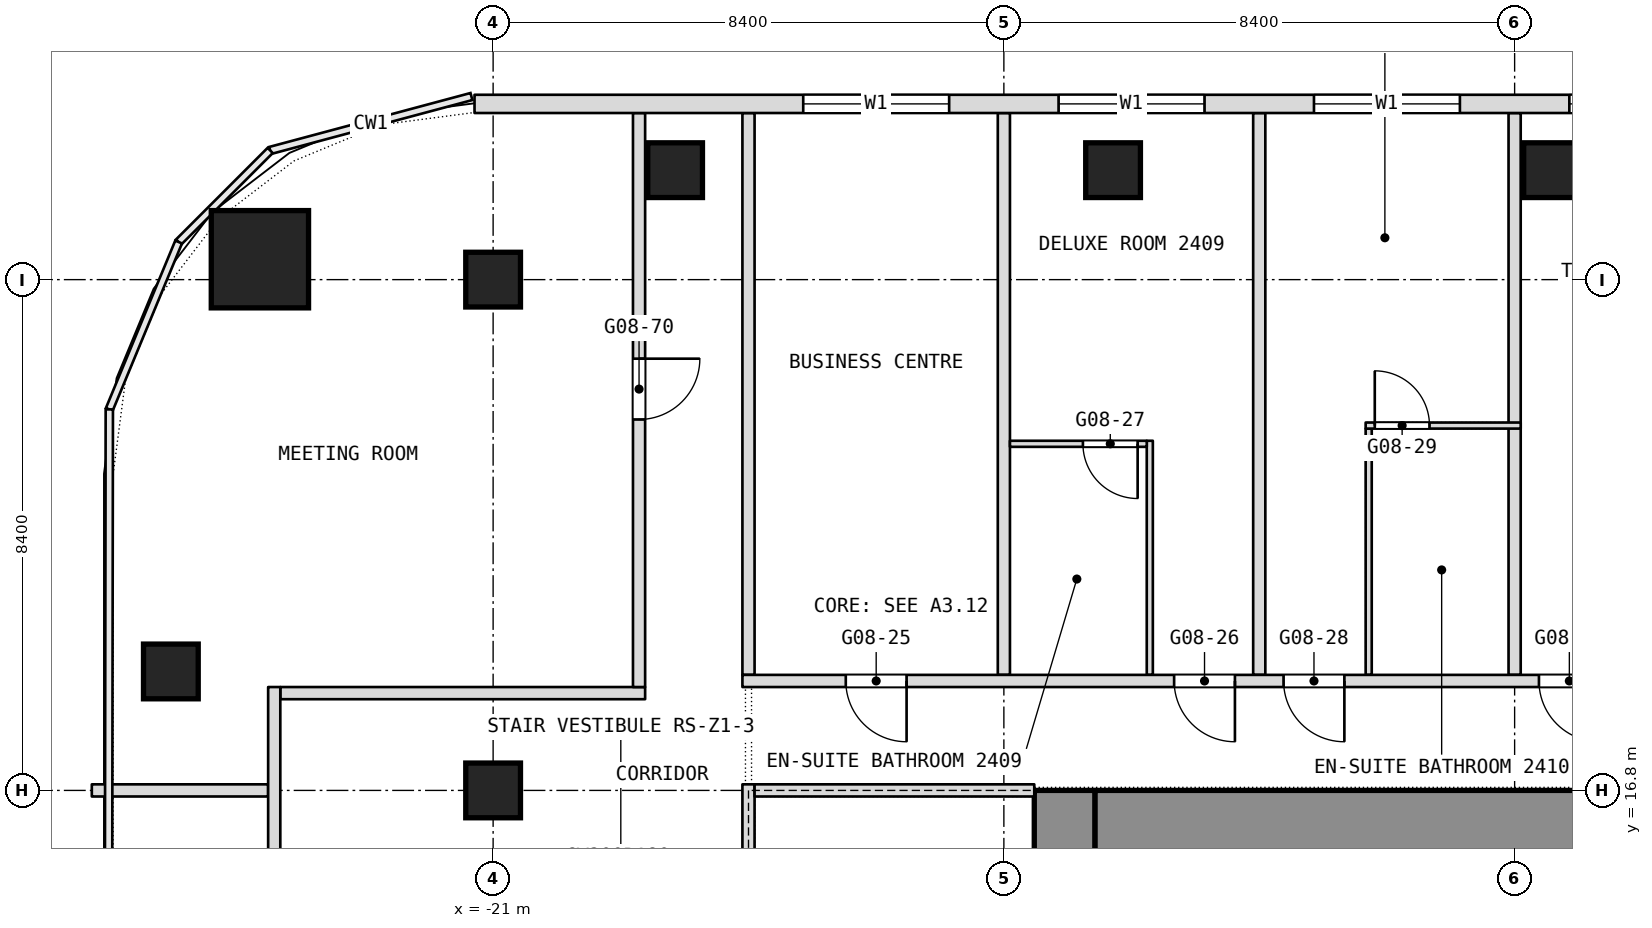
"""IFC4 building model, lengths in metres.
Left out: names, types, materials, properties, quantities, classifications, styles, units other than length and angle.
Written with IfcOpenShell. Run it as: python <this file> out.ifc"""

import sys

from ifc_helpers import new_model, si_unit, direction, frame, frame_2d, origin, origin_2d, place, context, subcontext, project, spatial, rectangle, extrude, element, fill, save


model = new_model("IFC4")
c1 = context("Model", 3, precision=1e-05, world=origin(), true_north=direction((0.0, 1.0)))
c2 = subcontext(c1, "Body", "Model", "MODEL_VIEW")
j1 = project(units=[si_unit("LENGTHUNIT", "METRE"), si_unit("PLANEANGLEUNIT", "RADIAN")], contexts=[c1])
p1 = place(None, origin())
s1 = spatial("IfcSite", under=j1, at=p1, CompositionType="ELEMENT")
p2 = place(p1, origin())
s2 = spatial("IfcBuilding", under=s1, at=p2, CompositionType="ELEMENT")
p3 = place(p2, frame((0.0, 0.0, 112.1)))
s3 = spatial("IfcBuildingStorey", under=s2, at=p3, CompositionType="ELEMENT", Elevation=112.1)
p4 = place(p3, frame((-11.6, 0.0, 0.0), z_axis=(0.0, 0.0, 1.0), x_axis=(0.0, 1.0, 0.0)))
e1 = element("IfcWall", 1, at=p4, inside=s3, PredefinedType="SHEAR", context=c2, shape_type="SweptSolid", body=[
    extrude(rectangle(XDim=16.8, YDim=1.0, at=frame_2d((8.4, 0.0))), origin(), (0.0, 0.0, 1.0), 3.6),
])
p5 = place(p4, frame((1.762, 0.0, 0.0)))
e2 = element("IfcOpeningElement", 2, at=p5, cuts=e1, PredefinedType="OPENING", context=c2, shape_type="SweptSolid", body=[
    extrude(rectangle(XDim=0.9, YDim=2.1, at=frame_2d((0.45, 1.05))), frame((0.0, 0.5, 0.0), z_axis=(0.0, -1.0, 0.0), x_axis=(1.0, 0.0, 0.0)), (0.0, 0.0, 1.0), 1.0),
])
p6 = place(p4, frame((4.387, 0.0, 0.0)))
e3 = element("IfcOpeningElement", 3, at=p6, cuts=e1, PredefinedType="OPENING", context=c2, shape_type="SweptSolid", body=[
    extrude(rectangle(XDim=0.9, YDim=2.1, at=frame_2d((0.45, 1.05))), frame((0.0, 0.5, 0.0), z_axis=(0.0, -1.0, 0.0), x_axis=(1.0, 0.0, 0.0)), (0.0, 0.0, 1.0), 1.0),
])
p7 = place(p4, frame((6.825, 0.0, 0.0)))
e4 = element("IfcOpeningElement", 4, at=p7, cuts=e1, PredefinedType="OPENING", context=c2, shape_type="SweptSolid", body=[
    extrude(rectangle(XDim=1.2, YDim=2.1, at=frame_2d((0.6, 1.05))), frame((0.0, 0.5, 0.0), z_axis=(0.0, -1.0, 0.0), x_axis=(1.0, 0.0, 0.0)), (0.0, 0.0, 1.0), 1.0),
])
p8 = place(p4, frame((12.3, 0.0, 0.0)))
e5 = element("IfcOpeningElement", 5, at=p8, cuts=e1, PredefinedType="OPENING", context=c2, shape_type="SweptSolid", body=[
    extrude(rectangle(XDim=0.9, YDim=2.1, at=frame_2d((0.45, 1.05))), frame((0.0, 0.5, 0.0), z_axis=(0.0, -1.0, 0.0), x_axis=(1.0, 0.0, 0.0)), (0.0, 0.0, 1.0), 1.0),
])
p9 = place(p4, frame((8.775, 0.0, 0.0)))
e6 = element("IfcOpeningElement", 6, at=p9, cuts=e1, PredefinedType="OPENING", context=c2, shape_type="SweptSolid", body=[
    extrude(rectangle(XDim=1.2, YDim=2.1, at=frame_2d((0.6, 1.05))), frame((0.0, 0.5, 0.0), z_axis=(0.0, -1.0, 0.0), x_axis=(1.0, 0.0, 0.0)), (0.0, 0.0, 1.0), 1.0),
])
p10 = place(p3, frame((-11.1, 16.3, 0.0), z_axis=(0.0, 0.0, 1.0), x_axis=(1.0, 0.0, 0.0)))
e7 = element("IfcWall", 7, at=p10, inside=s3, PredefinedType="SHEAR", context=c2, shape_type="SweptSolid", body=[
    extrude(rectangle(XDim=22.2, YDim=1.0, at=frame_2d((11.1, 0.0))), origin(), (0.0, 0.0, 1.0), 3.6),
])
p11 = place(p3, frame((-24.835, 25.535, 0.0), z_axis=(0.0, 0.0, 1.0), x_axis=(1.0, 0.0, 0.0)))
e8 = element("IfcColumn", 8, at=p11, inside=s3, PredefinedType="COLUMN", context=c2, shape_type="SweptSolid", body=[
    extrude(rectangle(XDim=1.6, YDim=1.6, at=origin_2d()), origin(), (0.0, 0.0, 1.0), 3.6),
])
for number, where, z_axis, x_axis in (
    (9, (-21.0, 16.8, 0.0), (0.0, 0.0, 1.0), (1.0, 0.0, 0.0)),
    (10, (-21.0, 25.2, 0.0), (0.0, 0.0, 1.0), (1.0, 0.0, 0.0)),
    (11, (-26.3, 18.756, 0.0), (0.0, 0.0, 1.0), (1.0, 0.0, 0.0)),
    (12, (-18.007, 27.0, 0.0), (0.0, 0.0, 1.0), (1.0, 0.0, 0.0)),
    (13, (-10.804, 27.0, 0.0), (0.0, 0.0, 1.0), (1.0, 0.0, 0.0)),
    (14, (-3.601, 27.0, 0.0), (0.0, 0.0, 1.0), (1.0, 0.0, 0.0)),
):
    element("IfcColumn", number, at=place(p3, frame(where, z_axis=z_axis, x_axis=x_axis)), inside=s3, PredefinedType="COLUMN", context=c2, shape_type="SweptSolid", body=[
        extrude(rectangle(XDim=0.9, YDim=0.9, at=origin_2d()), origin(), (0.0, 0.0, 1.0), 3.6),
    ])
p12 = place(p3, frame((-4.2, 18.7, 0.0), z_axis=(0.0, 0.0, 1.0), x_axis=(0.0, 1.0, 0.0)))
e15 = element("IfcWall", 15, at=p12, inside=s3, PredefinedType="PARTITIONING", context=c2, shape_type="SweptSolid", body=[
    extrude(rectangle(XDim=9.24, YDim=0.2, at=frame_2d((4.62, 0.0))), origin(), (0.0, 0.0, 1.0), 3.34),
])
p13 = place(p3, frame((-6.6, 18.7, 0.0), z_axis=(0.0, 0.0, 1.0), x_axis=(0.0, 1.0, 0.0)))
e16 = element("IfcWall", 16, at=p13, inside=s3, PredefinedType="PARTITIONING", context=c2, shape_type="SweptSolid", body=[
    extrude(rectangle(XDim=4.05, YDim=0.1, at=frame_2d((2.025, 0.0))), origin(), (0.0, 0.0, 1.0), 3.34),
])
p14 = place(p3, frame((-8.4, 18.7, 0.0), z_axis=(0.0, 0.0, 1.0), x_axis=(0.0, 1.0, 0.0)))
e17 = element("IfcWall", 17, at=p14, inside=s3, PredefinedType="PARTITIONING", context=c2, shape_type="SweptSolid", body=[
    extrude(rectangle(XDim=9.24, YDim=0.2, at=frame_2d((4.62, 0.0))), origin(), (0.0, 0.0, 1.0), 3.34),
])
p15 = place(p3, frame((-10.2, 18.7, 0.0), z_axis=(0.0, 0.0, 1.0), x_axis=(0.0, 1.0, 0.0)))
e18 = element("IfcWall", 18, at=p15, inside=s3, PredefinedType="PARTITIONING", context=c2, shape_type="SweptSolid", body=[
    extrude(rectangle(XDim=3.85, YDim=0.1, at=frame_2d((1.925, 0.0))), origin(), (0.0, 0.0, 1.0), 3.34),
])
for number, where, z_axis, x_axis in (
    (19, (-12.6, 18.7, 0.0), (0.0, 0.0, 1.0), (0.0, 1.0, 0.0)),
    (20, (-16.8, 18.7, 0.0), (0.0, 0.0, 1.0), (0.0, 1.0, 0.0)),
):
    element("IfcWall", number, at=place(p3, frame(where, z_axis=z_axis, x_axis=x_axis)), inside=s3, PredefinedType="PARTITIONING", context=c2, shape_type="SweptSolid", body=[
        extrude(rectangle(XDim=9.24, YDim=0.2, at=frame_2d((4.62, 0.0))), origin(), (0.0, 0.0, 1.0), 3.34),
    ])
p16 = place(p3, frame((-27.6, 16.8, 0.0), z_axis=(0.0, 0.0, 1.0), x_axis=(1.0, 0.0, 0.0)))
e21 = element("IfcWall", 21, at=p16, inside=s3, PredefinedType="PARTITIONING", context=c2, shape_type="SweptSolid", body=[
    extrude(rectangle(XDim=2.9, YDim=0.2, at=frame_2d((1.45, 0.0))), origin(), (0.0, 0.0, 1.0), 2.89),
])
p17 = place(p3, frame((-24.5, 18.4, 0.0), z_axis=(0.0, 0.0, 1.0), x_axis=(1.0, 0.0, 0.0)))
e22 = element("IfcWall", 22, at=p17, inside=s3, PredefinedType="PARTITIONING", context=c2, shape_type="SweptSolid", body=[
    extrude(rectangle(XDim=6.0, YDim=0.2, at=frame_2d((3.0, 0.0))), origin(), (0.0, 0.0, 1.0), 3.34),
])
p18 = place(p3, frame((-18.6, 18.5, 0.0), z_axis=(0.0, 0.0, 1.0), x_axis=(0.0, 1.0, 0.0)))
e23 = element("IfcWall", 23, at=p18, inside=s3, PredefinedType="PARTITIONING", context=c2, shape_type="SweptSolid", body=[
    extrude(rectangle(XDim=9.44, YDim=0.2, at=frame_2d((4.72, 0.0))), origin(), (0.0, 0.0, 1.0), 3.34),
])
p19 = place(p18, frame((4.4, 0.0, 0.0)))
e24 = element("IfcOpeningElement", 24, at=p19, cuts=e23, PredefinedType="OPENING", context=c2, shape_type="SweptSolid", body=[
    extrude(rectangle(XDim=1.0, YDim=2.1, at=frame_2d((0.5, 1.05))), frame((0.0, 0.1, 0.0), z_axis=(0.0, -1.0, 0.0), x_axis=(1.0, 0.0, 0.0)), (0.0, 0.0, 1.0), 0.2),
])
p20 = place(p3, frame((-16.9, 18.6, 0.0), z_axis=(0.0, 0.0, 1.0), x_axis=(1.0, 0.0, 0.0)))
e25 = element("IfcWall", 25, at=p20, inside=s3, PredefinedType="PARTITIONING", context=c2, shape_type="SweptSolid", body=[
    extrude(rectangle(XDim=18.4, YDim=0.2, at=frame_2d((9.2, 0.0))), origin(), (0.0, 0.0, 1.0), 3.34),
])
p21 = place(p20, frame((1.7, 0.0, 0.0)))
e26 = element("IfcOpeningElement", 26, at=p21, cuts=e25, PredefinedType="OPENING", context=c2, shape_type="SweptSolid", body=[
    extrude(rectangle(XDim=1.0, YDim=2.1, at=frame_2d((0.5, 1.05))), frame((0.0, 0.1, 0.0), z_axis=(0.0, -1.0, 0.0), x_axis=(1.0, 0.0, 0.0)), (0.0, 0.0, 1.0), 0.2),
])
p22 = place(p20, frame((7.1, 0.0, 0.0)))
e27 = element("IfcOpeningElement", 27, at=p22, cuts=e25, PredefinedType="OPENING", context=c2, shape_type="SweptSolid", body=[
    extrude(rectangle(XDim=1.0, YDim=2.1, at=frame_2d((0.5, 1.05))), frame((0.0, 0.1, 0.0), z_axis=(0.0, -1.0, 0.0), x_axis=(1.0, 0.0, 0.0)), (0.0, 0.0, 1.0), 0.2),
])
p23 = place(p20, frame((8.9, 0.0, 0.0)))
e28 = element("IfcOpeningElement", 28, at=p23, cuts=e25, PredefinedType="OPENING", context=c2, shape_type="SweptSolid", body=[
    extrude(rectangle(XDim=1.0, YDim=2.1, at=frame_2d((0.5, 1.05))), frame((0.0, 0.1, 0.0), z_axis=(0.0, -1.0, 0.0), x_axis=(1.0, 0.0, 0.0)), (0.0, 0.0, 1.0), 0.2),
])
p24 = place(p20, frame((13.1, 0.0, 0.0)))
e29 = element("IfcOpeningElement", 29, at=p24, cuts=e25, PredefinedType="OPENING", context=c2, shape_type="SweptSolid", body=[
    extrude(rectangle(XDim=1.0, YDim=2.1, at=frame_2d((0.5, 1.05))), frame((0.0, 0.1, 0.0), z_axis=(0.0, -1.0, 0.0), x_axis=(1.0, 0.0, 0.0)), (0.0, 0.0, 1.0), 0.2),
])
p25 = place(p3, frame((-12.5, 22.5, 0.0), z_axis=(0.0, 0.0, 1.0), x_axis=(1.0, 0.0, 0.0)))
e30 = element("IfcWall", 30, at=p25, inside=s3, PredefinedType="PARTITIONING", context=c2, shape_type="SweptSolid", body=[
    extrude(rectangle(XDim=2.25, YDim=0.1, at=frame_2d((1.125, 0.0))), origin(), (0.0, 0.0, 1.0), 3.34),
])
p26 = place(p25, frame((1.2, 0.0, 0.0)))
e31 = element("IfcOpeningElement", 31, at=p26, cuts=e30, PredefinedType="OPENING", context=c2, shape_type="SweptSolid", body=[
    extrude(rectangle(XDim=0.9, YDim=2.1, at=frame_2d((0.45, 1.05))), frame((0.0, 0.05, 0.0), z_axis=(0.0, -1.0, 0.0), x_axis=(1.0, 0.0, 0.0)), (0.0, 0.0, 1.0), 0.1),
])
p27 = place(p3, frame((-6.65, 22.8, 0.0), z_axis=(0.0, 0.0, 1.0), x_axis=(1.0, 0.0, 0.0)))
e32 = element("IfcWall", 32, at=p27, inside=s3, PredefinedType="PARTITIONING", context=c2, shape_type="SweptSolid", body=[
    extrude(rectangle(XDim=2.55, YDim=0.1, at=frame_2d((1.275, 0.0))), origin(), (0.0, 0.0, 1.0), 3.34),
])
p28 = place(p27, frame((0.15, 0.0, 0.0)))
e33 = element("IfcOpeningElement", 33, at=p28, cuts=e32, PredefinedType="OPENING", context=c2, shape_type="SweptSolid", body=[
    extrude(rectangle(XDim=0.9, YDim=2.1, at=frame_2d((0.45, 1.05))), frame((0.0, 0.05, 0.0), z_axis=(0.0, -1.0, 0.0), x_axis=(1.0, 0.0, 0.0)), (0.0, 0.0, 1.0), 0.1),
])
p29 = place(p3, frame((-24.6, 6.9, 0.0), z_axis=(0.0, 0.0, 1.0), x_axis=(0.0, 1.0, 0.0)))
e34 = element("IfcWall", 34, at=p29, inside=s3, PredefinedType="PARTITIONING", context=c2, shape_type="SweptSolid", body=[
    extrude(rectangle(XDim=11.6, YDim=0.2, at=frame_2d((5.8, 0.0))), origin(), (0.0, 0.0, 1.0), 3.34),
])
p30 = place(p29, frame((5.45, 0.0, 0.0)))
e35 = element("IfcOpeningElement", 35, at=p30, cuts=e34, PredefinedType="OPENING", context=c2, shape_type="SweptSolid", body=[
    extrude(rectangle(XDim=1.8, YDim=2.1, at=frame_2d((0.9, 1.05))), frame((0.0, 0.1, 0.0), z_axis=(0.0, -1.0, 0.0), x_axis=(1.0, 0.0, 0.0)), (0.0, 0.0, 1.0), 0.2),
])
p31 = place(p29, frame((0.3, 0.0, 0.0)))
e36 = element("IfcOpeningElement", 36, at=p31, cuts=e34, PredefinedType="OPENING", context=c2, shape_type="SweptSolid", body=[
    extrude(rectangle(XDim=1.0, YDim=2.1, at=frame_2d((0.5, 1.05))), frame((0.0, 0.1, 0.0), z_axis=(0.0, -1.0, 0.0), x_axis=(1.0, 0.0, 0.0)), (0.0, 0.0, 1.0), 0.2),
])
p32 = place(p3, frame((21.306, 28.09, 0.0), z_axis=(0.0, 0.0, 1.0), x_axis=(-1.0, 0.0, 0.0)))
e37 = element("IfcWall", 37, at=p32, inside=s3, PredefinedType="NOTDEFINED", context=c2, shape_type="SweptSolid", body=[
    extrude(rectangle(XDim=42.612, YDim=0.3, at=frame_2d((21.306, 0.0))), origin(), (0.0, 0.0, 1.0), 3.6),
])
p33 = place(p32, frame((5.406, 0.0, 0.9)))
e38 = element("IfcOpeningElement", 38, at=p33, cuts=e37, PredefinedType="OPENING", context=c2, shape_type="SweptSolid", body=[
    extrude(rectangle(XDim=2.4, YDim=2.1, at=frame_2d((1.2, 1.05))), frame((0.0, 0.15, 0.0), z_axis=(0.0, -1.0, 0.0), x_axis=(1.0, 0.0, 0.0)), (0.0, 0.0, 1.0), 0.3),
])
p34 = place(p32, frame((9.606, 0.0, 0.9)))
e39 = element("IfcOpeningElement", 39, at=p34, cuts=e37, PredefinedType="OPENING", context=c2, shape_type="SweptSolid", body=[
    extrude(rectangle(XDim=2.4, YDim=2.1, at=frame_2d((1.2, 1.05))), frame((0.0, 0.15, 0.0), z_axis=(0.0, -1.0, 0.0), x_axis=(1.0, 0.0, 0.0)), (0.0, 0.0, 1.0), 0.3),
])
p35 = place(p32, frame((13.806, 0.0, 0.9)))
e40 = element("IfcOpeningElement", 40, at=p35, cuts=e37, PredefinedType="OPENING", context=c2, shape_type="SweptSolid", body=[
    extrude(rectangle(XDim=2.4, YDim=2.1, at=frame_2d((1.2, 1.05))), frame((0.0, 0.15, 0.0), z_axis=(0.0, -1.0, 0.0), x_axis=(1.0, 0.0, 0.0)), (0.0, 0.0, 1.0), 0.3),
])
p36 = place(p32, frame((18.006, 0.0, 0.9)))
e41 = element("IfcOpeningElement", 41, at=p36, cuts=e37, PredefinedType="OPENING", context=c2, shape_type="SweptSolid", body=[
    extrude(rectangle(XDim=2.4, YDim=2.1, at=frame_2d((1.2, 1.05))), frame((0.0, 0.15, 0.0), z_axis=(0.0, -1.0, 0.0), x_axis=(1.0, 0.0, 0.0)), (0.0, 0.0, 1.0), 0.3),
])
p37 = place(p32, frame((22.206, 0.0, 0.9)))
e42 = element("IfcOpeningElement", 42, at=p37, cuts=e37, PredefinedType="OPENING", context=c2, shape_type="SweptSolid", body=[
    extrude(rectangle(XDim=2.4, YDim=2.1, at=frame_2d((1.2, 1.05))), frame((0.0, 0.15, 0.0), z_axis=(0.0, -1.0, 0.0), x_axis=(1.0, 0.0, 0.0)), (0.0, 0.0, 1.0), 0.3),
])
p38 = place(p32, frame((26.406, 0.0, 0.9)))
e43 = element("IfcOpeningElement", 43, at=p38, cuts=e37, PredefinedType="OPENING", context=c2, shape_type="SweptSolid", body=[
    extrude(rectangle(XDim=2.4, YDim=2.1, at=frame_2d((1.2, 1.05))), frame((0.0, 0.15, 0.0), z_axis=(0.0, -1.0, 0.0), x_axis=(1.0, 0.0, 0.0)), (0.0, 0.0, 1.0), 0.3),
])
p39 = place(p32, frame((30.606, 0.0, 0.9)))
e44 = element("IfcOpeningElement", 44, at=p39, cuts=e37, PredefinedType="OPENING", context=c2, shape_type="SweptSolid", body=[
    extrude(rectangle(XDim=2.4, YDim=2.1, at=frame_2d((1.2, 1.05))), frame((0.0, 0.15, 0.0), z_axis=(0.0, -1.0, 0.0), x_axis=(1.0, 0.0, 0.0)), (0.0, 0.0, 1.0), 0.3),
])
p40 = place(p32, frame((34.806, 0.0, 0.9)))
e45 = element("IfcOpeningElement", 45, at=p40, cuts=e37, PredefinedType="OPENING", context=c2, shape_type="SweptSolid", body=[
    extrude(rectangle(XDim=2.4, YDim=2.1, at=frame_2d((1.2, 1.05))), frame((0.0, 0.15, 0.0), z_axis=(0.0, -1.0, 0.0), x_axis=(1.0, 0.0, 0.0)), (0.0, 0.0, 1.0), 0.3),
])
p41 = place(p3, frame((-16.8, -0.1, 0.0), z_axis=(0.0, 0.0, 1.0), x_axis=(0.0, 1.0, 0.0)))
e46 = element("IfcWall", 46, at=p41, inside=s3, PredefinedType="PARTITIONING", context=c2, shape_type="SweptSolid", body=[
    extrude(rectangle(XDim=17.0, YDim=0.2, at=frame_2d((8.5, 0.0))), origin(), (0.0, 0.0, 1.0), 3.34),
])
p42 = place(p41, frame((2.2, 0.0, 0.0)))
e47 = element("IfcOpeningElement", 47, at=p42, cuts=e46, PredefinedType="OPENING", context=c2, shape_type="SweptSolid", body=[
    extrude(rectangle(XDim=1.8, YDim=2.1, at=frame_2d((0.9, 1.05))), frame((0.0, 0.1, 0.0), z_axis=(0.0, -1.0, 0.0), x_axis=(1.0, 0.0, 0.0)), (0.0, 0.0, 1.0), 0.2),
])
p43 = place(p41, frame((7.2, 0.0, 0.0)))
e48 = element("IfcOpeningElement", 48, at=p43, cuts=e46, PredefinedType="OPENING", context=c2, shape_type="SweptSolid", body=[
    extrude(rectangle(XDim=1.8, YDim=2.1, at=frame_2d((0.9, 1.05))), frame((0.0, 0.1, 0.0), z_axis=(0.0, -1.0, 0.0), x_axis=(1.0, 0.0, 0.0)), (0.0, 0.0, 1.0), 0.2),
])
p44 = place(p3, frame((-16.7, 16.8, 0.0), z_axis=(0.0, 0.0, 1.0), x_axis=(1.0, 0.0, 0.0)))
e49 = element("IfcWall", 49, at=p44, inside=s3, PredefinedType="PARTITIONING", context=c2, shape_type="SweptSolid", body=[
    extrude(rectangle(XDim=4.6, YDim=0.2, at=frame_2d((2.3, 0.0))), origin(), (0.0, 0.0, 1.0), 2.89),
])
p45 = place(p19, origin())
e50 = element("IfcDoor", 50, at=p45, inside=s3, OperationType="SINGLE_SWING_RIGHT", PredefinedType="DOOR", context=c2, shape_type="SweptSolid", body=[
    extrude(rectangle(XDim=1.0, YDim=2.1, at=frame_2d((0.5, 1.05))), frame((0.0, 0.025, 0.0), z_axis=(0.0, -1.0, 0.0), x_axis=(1.0, 0.0, 0.0)), (0.0, 0.0, 1.0), 0.05),
])
fill(e24, e50)
p46 = place(p21, origin())
e51 = element("IfcDoor", 51, at=p46, inside=s3, OperationType="SINGLE_SWING_RIGHT", PredefinedType="DOOR", context=c2, shape_type="SweptSolid", body=[
    extrude(rectangle(XDim=1.0, YDim=2.1, at=frame_2d((0.5, 1.05))), frame((0.0, 0.025, 0.0), z_axis=(0.0, -1.0, 0.0), x_axis=(1.0, 0.0, 0.0)), (0.0, 0.0, 1.0), 0.05),
])
fill(e26, e51)
p47 = place(p22, origin())
e52 = element("IfcDoor", 52, at=p47, inside=s3, OperationType="SINGLE_SWING_LEFT", PredefinedType="DOOR", context=c2, shape_type="SweptSolid", body=[
    extrude(rectangle(XDim=1.0, YDim=2.1, at=frame_2d((0.5, 1.05))), frame((0.0, 0.025, 0.0), z_axis=(0.0, -1.0, 0.0), x_axis=(1.0, 0.0, 0.0)), (0.0, 0.0, 1.0), 0.05),
])
fill(e27, e52)
p48 = place(p23, origin())
e53 = element("IfcDoor", 53, at=p48, inside=s3, OperationType="SINGLE_SWING_LEFT", PredefinedType="DOOR", context=c2, shape_type="SweptSolid", body=[
    extrude(rectangle(XDim=1.0, YDim=2.1, at=frame_2d((0.5, 1.05))), frame((0.0, 0.025, 0.0), z_axis=(0.0, -1.0, 0.0), x_axis=(1.0, 0.0, 0.0)), (0.0, 0.0, 1.0), 0.05),
])
fill(e28, e53)
p49 = place(p24, origin())
e54 = element("IfcDoor", 54, at=p49, inside=s3, OperationType="SINGLE_SWING_LEFT", PredefinedType="DOOR", context=c2, shape_type="SweptSolid", body=[
    extrude(rectangle(XDim=1.0, YDim=2.1, at=frame_2d((0.5, 1.05))), frame((0.0, 0.025, 0.0), z_axis=(0.0, -1.0, 0.0), x_axis=(1.0, 0.0, 0.0)), (0.0, 0.0, 1.0), 0.05),
])
fill(e29, e54)
p50 = place(p26, origin())
e55 = element("IfcDoor", 55, at=p50, inside=s3, OperationType="SINGLE_SWING_LEFT", PredefinedType="DOOR", context=c2, shape_type="SweptSolid", body=[
    extrude(rectangle(XDim=0.9, YDim=2.1, at=frame_2d((0.45, 1.05))), frame((0.0, 0.025, 0.0), z_axis=(0.0, -1.0, 0.0), x_axis=(1.0, 0.0, 0.0)), (0.0, 0.0, 1.0), 0.05),
])
fill(e31, e55)
p51 = place(p28, origin())
e56 = element("IfcDoor", 56, at=p51, inside=s3, OperationType="SINGLE_SWING_RIGHT", PredefinedType="DOOR", context=c2, shape_type="SweptSolid", body=[
    extrude(rectangle(XDim=0.9, YDim=2.1, at=frame_2d((0.45, 1.05))), frame((0.0, 0.025, 0.0), z_axis=(0.0, -1.0, 0.0), x_axis=(1.0, 0.0, 0.0)), (0.0, 0.0, 1.0), 0.05),
])
fill(e33, e56)
p52 = place(p37, origin())
e57 = element("IfcWindow", 57, at=p52, inside=s3, PartitioningType="SINGLE_PANEL", PredefinedType="WINDOW", context=c2, shape_type="SweptSolid", body=[
    extrude(rectangle(XDim=2.4, YDim=2.1, at=frame_2d((1.2, 1.05))), frame((0.0, 0.03, 0.0), z_axis=(0.0, -1.0, 0.0), x_axis=(1.0, 0.0, 0.0)), (0.0, 0.0, 1.0), 0.06),
])
fill(e42, e57)
p53 = place(p38, origin())
e58 = element("IfcWindow", 58, at=p53, inside=s3, PartitioningType="SINGLE_PANEL", PredefinedType="WINDOW", context=c2, shape_type="SweptSolid", body=[
    extrude(rectangle(XDim=2.4, YDim=2.1, at=frame_2d((1.2, 1.05))), frame((0.0, 0.03, 0.0), z_axis=(0.0, -1.0, 0.0), x_axis=(1.0, 0.0, 0.0)), (0.0, 0.0, 1.0), 0.06),
])
fill(e43, e58)
p54 = place(p39, origin())
e59 = element("IfcWindow", 59, at=p54, inside=s3, PartitioningType="SINGLE_PANEL", PredefinedType="WINDOW", context=c2, shape_type="SweptSolid", body=[
    extrude(rectangle(XDim=2.4, YDim=2.1, at=frame_2d((1.2, 1.05))), frame((0.0, 0.03, 0.0), z_axis=(0.0, -1.0, 0.0), x_axis=(1.0, 0.0, 0.0)), (0.0, 0.0, 1.0), 0.06),
])
fill(e44, e59)
p55 = place(p40, origin())
e60 = element("IfcWindow", 60, at=p55, inside=s3, PartitioningType="SINGLE_PANEL", PredefinedType="WINDOW", context=c2, shape_type="SweptSolid", body=[
    extrude(rectangle(XDim=2.4, YDim=2.1, at=frame_2d((1.2, 1.05))), frame((0.0, 0.03, 0.0), z_axis=(0.0, -1.0, 0.0), x_axis=(1.0, 0.0, 0.0)), (0.0, 0.0, 1.0), 0.06),
])
fill(e45, e60)
save(model, sys.argv[1])
